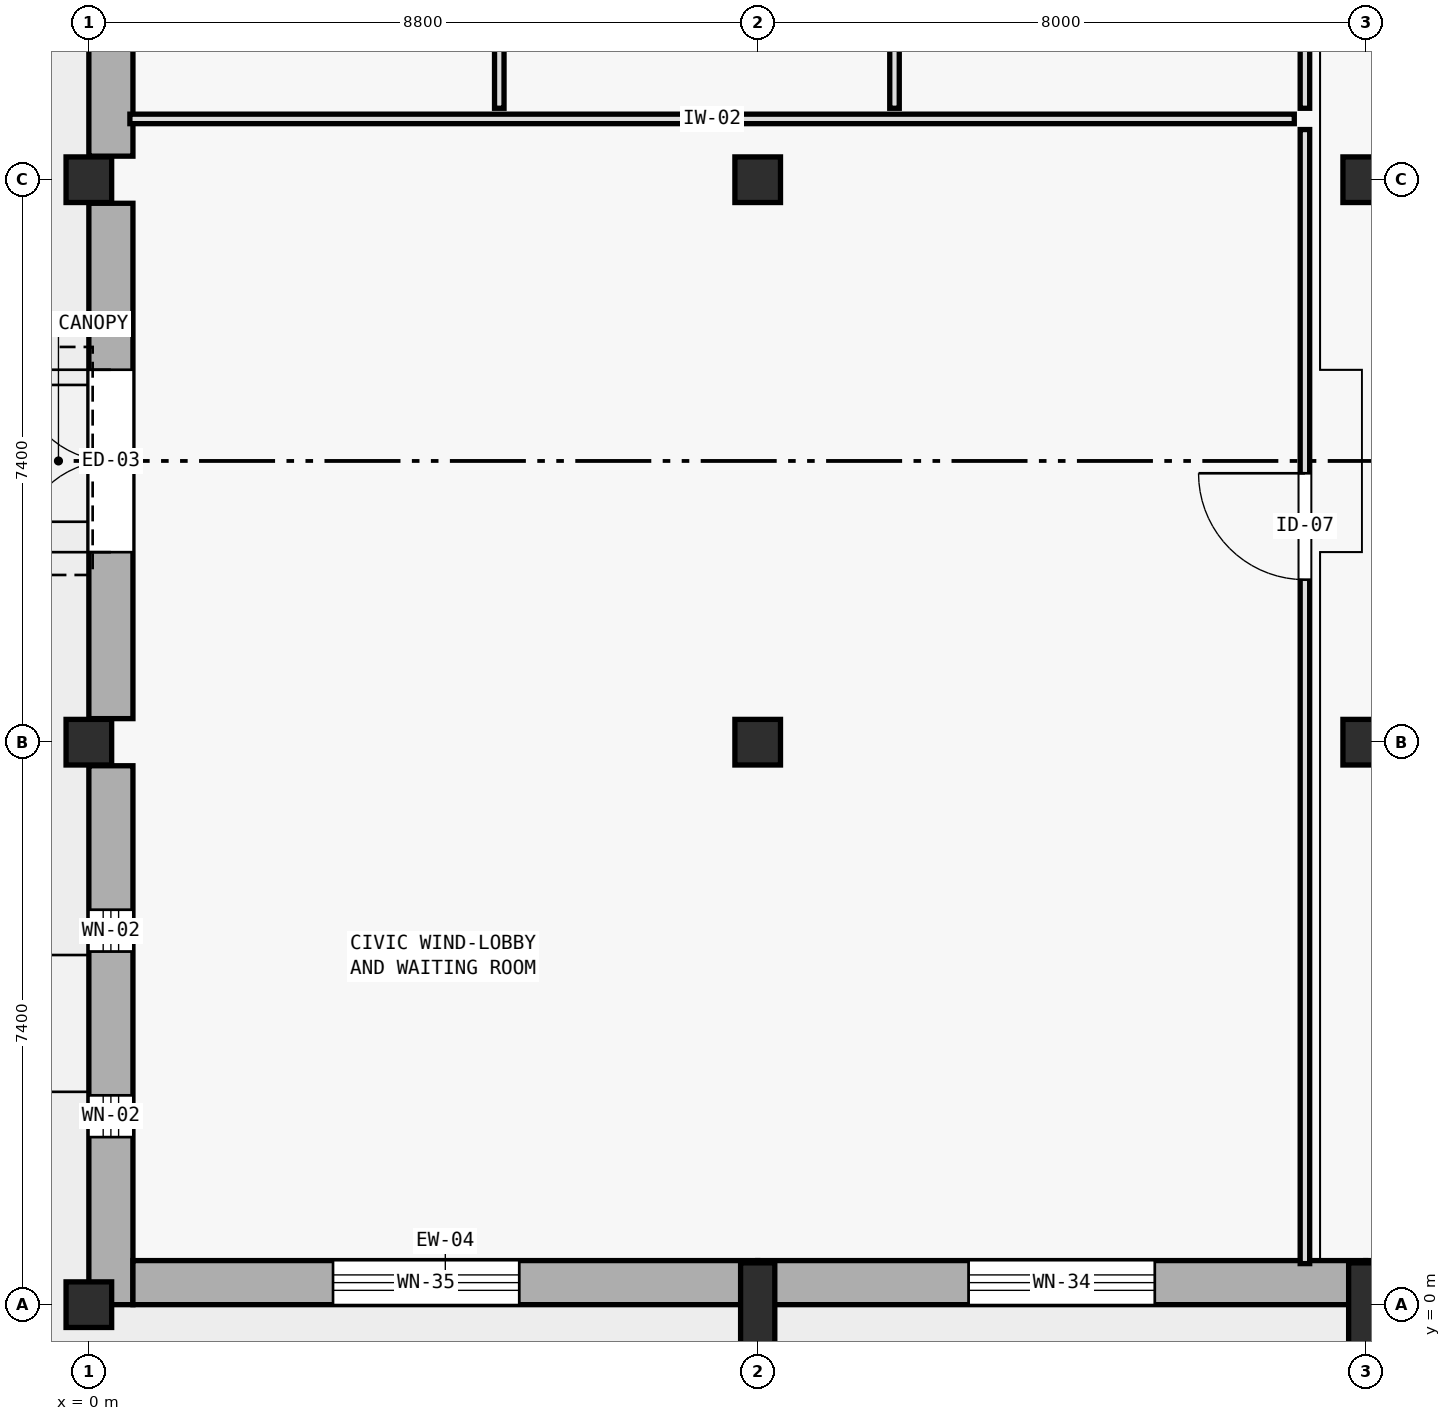
"""IFC4 building model, lengths in metres.
Left out: names, types, materials, properties, quantities, classifications, styles, units other than length and angle.
Written with IfcOpenShell. Run it as: python <this file> out.ifc"""

import sys

from ifc_helpers import new_model, si_unit, direction, frame, frame_2d, origin, origin_2d, place, context, subcontext, project, spatial, rectangle, extrude, element, fill, save


model = new_model("IFC4")
c1 = context("Model", 3, precision=1e-05, world=origin(), true_north=direction((0.0, 1.0)))
c2 = subcontext(c1, "Body", "Model", "MODEL_VIEW")
j1 = project(units=[si_unit("LENGTHUNIT", "METRE"), si_unit("PLANEANGLEUNIT", "RADIAN")], contexts=[c1])
p1 = place(None, origin())
s1 = spatial("IfcSite", under=j1, at=p1, CompositionType="ELEMENT")
p2 = place(p1, origin())
s2 = spatial("IfcBuilding", under=s1, at=p2, CompositionType="ELEMENT")
p3 = place(p2, origin())
s3 = spatial("IfcBuildingStorey", under=s2, at=p3, CompositionType="ELEMENT", Elevation=0.0)
for number, where, z_axis, x_axis in (
    (1, (0.0, 0.0, 0.0), (0.0, 0.0, 1.0), (1.0, 0.0, 0.0)),
    (2, (0.0, 7.4, 0.0), (0.0, 0.0, 1.0), (1.0, 0.0, 0.0)),
    (3, (0.0, 14.8, 0.0), (0.0, 0.0, 1.0), (1.0, 0.0, 0.0)),
):
    element("IfcColumn", number, at=place(p3, frame(where, z_axis=z_axis, x_axis=x_axis)), inside=s3, PredefinedType="COLUMN", context=c2, shape_type="SweptSolid", body=[
        extrude(rectangle(XDim=0.6, YDim=0.6, at=origin_2d()), origin(), (0.0, 0.0, 1.0), 5.4),
    ])
p4 = place(p3, frame((8.8, 0.0, 0.0), z_axis=(0.0, 0.0, 1.0), x_axis=(1.0, 0.0, 0.0)))
e4 = element("IfcColumn", 4, at=p4, inside=s3, PredefinedType="PILASTER", context=c2, shape_type="SweptSolid", body=[
    extrude(rectangle(XDim=0.45, YDim=1.1, at=origin_2d()), origin(), (0.0, 0.0, 1.0), 5.4),
])
for number, where, z_axis, x_axis in (
    (5, (8.8, 7.4, 0.0), (0.0, 0.0, 1.0), (1.0, 0.0, 0.0)),
    (6, (8.8, 14.8, 0.0), (0.0, 0.0, 1.0), (1.0, 0.0, 0.0)),
):
    element("IfcColumn", number, at=place(p3, frame(where, z_axis=z_axis, x_axis=x_axis)), inside=s3, PredefinedType="COLUMN", context=c2, shape_type="SweptSolid", body=[
        extrude(rectangle(XDim=0.6, YDim=0.6, at=origin_2d()), origin(), (0.0, 0.0, 1.0), 5.4),
    ])
p5 = place(p3, frame((16.8, 0.0, 0.0), z_axis=(0.0, 0.0, 1.0), x_axis=(1.0, 0.0, 0.0)))
e7 = element("IfcColumn", 7, at=p5, inside=s3, PredefinedType="PILASTER", context=c2, shape_type="SweptSolid", body=[
    extrude(rectangle(XDim=0.45, YDim=1.1, at=origin_2d()), origin(), (0.0, 0.0, 1.0), 5.4),
])
for number, where, z_axis, x_axis in (
    (8, (16.8, 7.4, 0.0), (0.0, 0.0, 1.0), (1.0, 0.0, 0.0)),
    (9, (16.8, 14.8, 0.0), (0.0, 0.0, 1.0), (1.0, 0.0, 0.0)),
):
    element("IfcColumn", number, at=place(p3, frame(where, z_axis=z_axis, x_axis=x_axis)), inside=s3, PredefinedType="COLUMN", context=c2, shape_type="SweptSolid", body=[
        extrude(rectangle(XDim=0.6, YDim=0.6, at=origin_2d()), origin(), (0.0, 0.0, 1.0), 5.4),
    ])
p6 = place(p3, frame((0.29, 0.0, 0.0), z_axis=(0.0, 0.0, 1.0), x_axis=(0.0, 1.0, 0.0)))
e10 = element("IfcWall", 10, at=p6, inside=s3, PredefinedType="STANDARD", context=c2, shape_type="SweptSolid", body=[
    extrude(rectangle(XDim=7.09, YDim=0.58, at=frame_2d((3.545, 0.0))), origin(), (0.0, 0.0, 1.0), 5.14),
])
p7 = place(p6, frame((2.205, 0.0, 0.9)))
e11 = element("IfcOpeningElement", 11, at=p7, cuts=e10, PredefinedType="OPENING", context=c2, shape_type="SweptSolid", body=[
    extrude(rectangle(XDim=0.55, YDim=1.75, at=frame_2d((0.275, 0.875))), frame((0.0, 0.3, 0.0), z_axis=(0.0, -1.0, 0.0), x_axis=(1.0, 0.0, 0.0)), (0.0, 0.0, 1.0), 0.6),
])
p8 = place(p6, frame((4.646, 0.0, 0.9)))
e12 = element("IfcOpeningElement", 12, at=p8, cuts=e10, PredefinedType="OPENING", context=c2, shape_type="SweptSolid", body=[
    extrude(rectangle(XDim=0.55, YDim=1.75, at=frame_2d((0.275, 0.875))), frame((0.0, 0.3, 0.0), z_axis=(0.0, -1.0, 0.0), x_axis=(1.0, 0.0, 0.0)), (0.0, 0.0, 1.0), 0.6),
])
p9 = place(p3, frame((0.29, 7.71, 0.0), z_axis=(0.0, 0.0, 1.0), x_axis=(0.0, 1.0, 0.0)))
e13 = element("IfcWall", 13, at=p9, inside=s3, PredefinedType="STANDARD", context=c2, shape_type="SweptSolid", body=[
    extrude(rectangle(XDim=6.78, YDim=0.58, at=frame_2d((3.39, 0.0))), origin(), (0.0, 0.0, 1.0), 5.14),
])
p10 = place(p9, frame((2.19, 0.0, 0.0)))
e14 = element("IfcOpeningElement", 14, at=p10, cuts=e13, PredefinedType="OPENING", context=c2, shape_type="SweptSolid", body=[
    extrude(rectangle(XDim=2.4, YDim=2.7, at=frame_2d((1.2, 1.35))), frame((0.0, 0.3, 0.0), z_axis=(0.0, -1.0, 0.0), x_axis=(1.0, 0.0, 0.0)), (0.0, 0.0, 1.0), 0.6),
])
p11 = place(p3, frame((0.29, 15.11, 0.0), z_axis=(0.0, 0.0, 1.0), x_axis=(0.0, 1.0, 0.0)))
e15 = element("IfcWall", 15, at=p11, inside=s3, PredefinedType="STANDARD", context=c2, shape_type="SweptSolid", body=[
    extrude(rectangle(XDim=7.09, YDim=0.58, at=frame_2d((3.545, 0.0))), origin(), (0.0, 0.0, 1.0), 5.14),
])
p12 = place(p11, frame((1.87, 0.0, 0.9)))
e16 = element("IfcOpeningElement", 16, at=p12, cuts=e15, PredefinedType="OPENING", context=c2, shape_type="SweptSolid", body=[
    extrude(rectangle(XDim=0.6, YDim=1.85, at=frame_2d((0.3, 0.925))), frame((0.0, 0.3, 0.0), z_axis=(0.0, -1.0, 0.0), x_axis=(1.0, 0.0, 0.0)), (0.0, 0.0, 1.0), 0.6),
])
p13 = place(p11, frame((4.31, 0.0, 0.9)))
e17 = element("IfcOpeningElement", 17, at=p13, cuts=e15, PredefinedType="OPENING", context=c2, shape_type="SweptSolid", body=[
    extrude(rectangle(XDim=0.6, YDim=1.85, at=frame_2d((0.3, 0.925))), frame((0.0, 0.3, 0.0), z_axis=(0.0, -1.0, 0.0), x_axis=(1.0, 0.0, 0.0)), (0.0, 0.0, 1.0), 0.6),
])
p14 = place(p3, frame((24.8, 0.29, 0.0), z_axis=(0.0, 0.0, 1.0), x_axis=(-1.0, 0.0, 0.0)))
e18 = element("IfcWall", 18, at=p14, inside=s3, PredefinedType="STANDARD", context=c2, shape_type="SweptSolid", body=[
    extrude(rectangle(XDim=8.0, YDim=0.58, at=frame_2d((4.0, 0.0))), origin(), (0.0, 0.0, 1.0), 5.14),
])
p15 = place(p14, frame((3.0, 0.0, 0.0)))
e19 = element("IfcOpeningElement", 19, at=p15, cuts=e18, PredefinedType="OPENING", context=c2, shape_type="SweptSolid", body=[
    extrude(rectangle(XDim=2.0, YDim=2.35, at=frame_2d((1.0, 1.175))), frame((0.0, 0.3, 0.0), z_axis=(0.0, -1.0, 0.0), x_axis=(1.0, 0.0, 0.0)), (0.0, 0.0, 1.0), 0.6),
])
p16 = place(p3, frame((16.8, 0.29, 0.0), z_axis=(0.0, 0.0, 1.0), x_axis=(-1.0, 0.0, 0.0)))
e20 = element("IfcWall", 20, at=p16, inside=s3, PredefinedType="STANDARD", context=c2, shape_type="SweptSolid", body=[
    extrude(rectangle(XDim=8.0, YDim=0.58, at=frame_2d((4.0, 0.0))), origin(), (0.0, 0.0, 1.0), 5.14),
])
p17 = place(p16, frame((2.775, 0.0, 0.9)))
e21 = element("IfcOpeningElement", 21, at=p17, cuts=e20, PredefinedType="OPENING", context=c2, shape_type="SweptSolid", body=[
    extrude(rectangle(XDim=2.45, YDim=2.2, at=frame_2d((1.225, 1.1))), frame((0.0, 0.3, 0.0), z_axis=(0.0, -1.0, 0.0), x_axis=(1.0, 0.0, 0.0)), (0.0, 0.0, 1.0), 0.6),
])
p18 = place(p3, frame((8.8, 0.29, 0.0), z_axis=(0.0, 0.0, 1.0), x_axis=(-1.0, 0.0, 0.0)))
e22 = element("IfcWall", 22, at=p18, inside=s3, PredefinedType="STANDARD", context=c2, shape_type="SweptSolid", body=[
    extrude(rectangle(XDim=8.22, YDim=0.58, at=frame_2d((4.11, 0.0))), origin(), (0.0, 0.0, 1.0), 5.14),
])
p19 = place(p18, frame((3.137, 0.0, 0.9)))
e23 = element("IfcOpeningElement", 23, at=p19, cuts=e22, PredefinedType="OPENING", context=c2, shape_type="SweptSolid", body=[
    extrude(rectangle(XDim=2.45, YDim=2.8, at=frame_2d((1.225, 1.4))), frame((0.0, 0.3, 0.0), z_axis=(0.0, -1.0, 0.0), x_axis=(1.0, 0.0, 0.0)), (0.0, 0.0, 1.0), 0.6),
])
p20 = place(p3, frame((0.54, 15.6, 0.0), z_axis=(0.0, 0.0, 1.0), x_axis=(1.0, 0.0, 0.0)))
e24 = element("IfcWall", 24, at=p20, inside=s3, PredefinedType="PARTITIONING", context=c2, shape_type="SweptSolid", body=[
    extrude(rectangle(XDim=15.32, YDim=0.125, at=frame_2d((7.66, 0.0))), origin(), (0.0, 0.0, 1.0), 4.27),
])
p21 = place(p3, frame((16.0, 0.54, 0.0), z_axis=(0.0, 0.0, 1.0), x_axis=(0.0, 1.0, 0.0)))
e25 = element("IfcWall", 25, at=p21, inside=s3, PredefinedType="PARTITIONING", context=c2, shape_type="SweptSolid", body=[
    extrude(rectangle(XDim=14.92, YDim=0.125, at=frame_2d((7.46, 0.0))), origin(), (0.0, 0.0, 1.0), 4.27),
])
p22 = place(p21, frame((8.998, 0.0, 0.0)))
e26 = element("IfcOpeningElement", 26, at=p22, cuts=e25, PredefinedType="OPENING", context=c2, shape_type="SweptSolid", body=[
    extrude(rectangle(XDim=1.4, YDim=2.2, at=frame_2d((0.7, 1.1))), frame((0.0, 0.073, 0.0), z_axis=(0.0, -1.0, 0.0), x_axis=(1.0, 0.0, 0.0)), (0.0, 0.0, 1.0), 0.145),
])
p23 = place(p3, frame((5.4, 15.74, 0.0), z_axis=(0.0, 0.0, 1.0), x_axis=(0.0, 1.0, 0.0)))
e27 = element("IfcWall", 27, at=p23, inside=s3, PredefinedType="PARTITIONING", context=c2, shape_type="SweptSolid", body=[
    extrude(rectangle(XDim=5.92, YDim=0.125, at=frame_2d((2.96, 0.0))), origin(), (0.0, 0.0, 1.0), 5.14),
])
p24 = place(p23, frame((2.435, 0.0, 0.0)))
e28 = element("IfcOpeningElement", 28, at=p24, cuts=e27, PredefinedType="OPENING", context=c2, shape_type="SweptSolid", body=[
    extrude(rectangle(XDim=1.05, YDim=2.1, at=frame_2d((0.525, 1.05))), frame((0.0, 0.073, 0.0), z_axis=(0.0, -1.0, 0.0), x_axis=(1.0, 0.0, 0.0)), (0.0, 0.0, 1.0), 0.145),
])
p25 = place(p3, frame((10.6, 15.74, 0.0), z_axis=(0.0, 0.0, 1.0), x_axis=(0.0, 1.0, 0.0)))
e29 = element("IfcWall", 29, at=p25, inside=s3, PredefinedType="PARTITIONING", context=c2, shape_type="SweptSolid", body=[
    extrude(rectangle(XDim=5.92, YDim=0.125, at=frame_2d((2.96, 0.0))), origin(), (0.0, 0.0, 1.0), 5.14),
])
p26 = place(p25, frame((2.435, 0.0, 0.0)))
e30 = element("IfcOpeningElement", 30, at=p26, cuts=e29, PredefinedType="OPENING", context=c2, shape_type="SweptSolid", body=[
    extrude(rectangle(XDim=1.05, YDim=2.1, at=frame_2d((0.525, 1.05))), frame((0.0, 0.073, 0.0), z_axis=(0.0, -1.0, 0.0), x_axis=(1.0, 0.0, 0.0)), (0.0, 0.0, 1.0), 0.145),
])
p27 = place(p3, frame((16.0, 15.74, 0.0), z_axis=(0.0, 0.0, 1.0), x_axis=(0.0, 1.0, 0.0)))
e31 = element("IfcWall", 31, at=p27, inside=s3, PredefinedType="PARTITIONING", context=c2, shape_type="SweptSolid", body=[
    extrude(rectangle(XDim=5.92, YDim=0.125, at=frame_2d((2.96, 0.0))), origin(), (0.0, 0.0, 1.0), 5.14),
])
p28 = place(p27, frame((2.485, 0.0, 0.0)))
e32 = element("IfcOpeningElement", 32, at=p28, cuts=e31, PredefinedType="OPENING", context=c2, shape_type="SweptSolid", body=[
    extrude(rectangle(XDim=0.95, YDim=2.1, at=frame_2d((0.475, 1.05))), frame((0.0, 0.073, 0.0), z_axis=(0.0, -1.0, 0.0), x_axis=(1.0, 0.0, 0.0)), (0.0, 0.0, 1.0), 0.145),
])
p29 = place(p7, origin())
e33 = element("IfcWindow", 33, at=p29, inside=s3, PartitioningType="SINGLE_PANEL", PredefinedType="WINDOW", context=c2, shape_type="SweptSolid", body=[
    extrude(rectangle(XDim=0.55, YDim=1.75, at=frame_2d((0.275, 0.875))), frame((0.0, 0.03, 0.0), z_axis=(0.0, -1.0, 0.0), x_axis=(1.0, 0.0, 0.0)), (0.0, 0.0, 1.0), 0.06),
])
fill(e11, e33)
p30 = place(p8, origin())
e34 = element("IfcWindow", 34, at=p30, inside=s3, PartitioningType="SINGLE_PANEL", PredefinedType="WINDOW", context=c2, shape_type="SweptSolid", body=[
    extrude(rectangle(XDim=0.55, YDim=1.75, at=frame_2d((0.275, 0.875))), frame((0.0, 0.03, 0.0), z_axis=(0.0, -1.0, 0.0), x_axis=(1.0, 0.0, 0.0)), (0.0, 0.0, 1.0), 0.06),
])
fill(e12, e34)
p31 = place(p10, origin())
e35 = element("IfcDoor", 35, at=p31, inside=s3, OperationType="DOUBLE_DOOR_SINGLE_SWING", PredefinedType="DOOR", context=c2, shape_type="SweptSolid", body=[
    extrude(rectangle(XDim=2.4, YDim=2.7, at=frame_2d((1.2, 1.35))), frame((0.0, 0.025, 0.0), z_axis=(0.0, -1.0, 0.0), x_axis=(1.0, 0.0, 0.0)), (0.0, 0.0, 1.0), 0.05),
])
fill(e14, e35)
p32 = place(p17, origin())
e36 = element("IfcWindow", 36, at=p32, inside=s3, PartitioningType="SINGLE_PANEL", PredefinedType="WINDOW", context=c2, shape_type="SweptSolid", body=[
    extrude(rectangle(XDim=2.45, YDim=2.2, at=frame_2d((1.225, 1.1))), frame((0.0, 0.03, 0.0), z_axis=(0.0, -1.0, 0.0), x_axis=(1.0, 0.0, 0.0)), (0.0, 0.0, 1.0), 0.06),
])
fill(e21, e36)
p33 = place(p19, origin())
e37 = element("IfcWindow", 37, at=p33, inside=s3, PartitioningType="SINGLE_PANEL", PredefinedType="WINDOW", context=c2, shape_type="SweptSolid", body=[
    extrude(rectangle(XDim=2.45, YDim=2.8, at=frame_2d((1.225, 1.4))), frame((0.0, 0.03, 0.0), z_axis=(0.0, -1.0, 0.0), x_axis=(1.0, 0.0, 0.0)), (0.0, 0.0, 1.0), 0.06),
])
fill(e23, e37)
p34 = place(p22, origin())
e38 = element("IfcDoor", 38, at=p34, inside=s3, OperationType="SINGLE_SWING_RIGHT", PredefinedType="DOOR", context=c2, shape_type="SweptSolid", body=[
    extrude(rectangle(XDim=1.4, YDim=2.2, at=frame_2d((0.7, 1.1))), frame((0.0, 0.025, 0.0), z_axis=(0.0, -1.0, 0.0), x_axis=(1.0, 0.0, 0.0)), (0.0, 0.0, 1.0), 0.05),
])
fill(e26, e38)
save(model, sys.argv[1])
